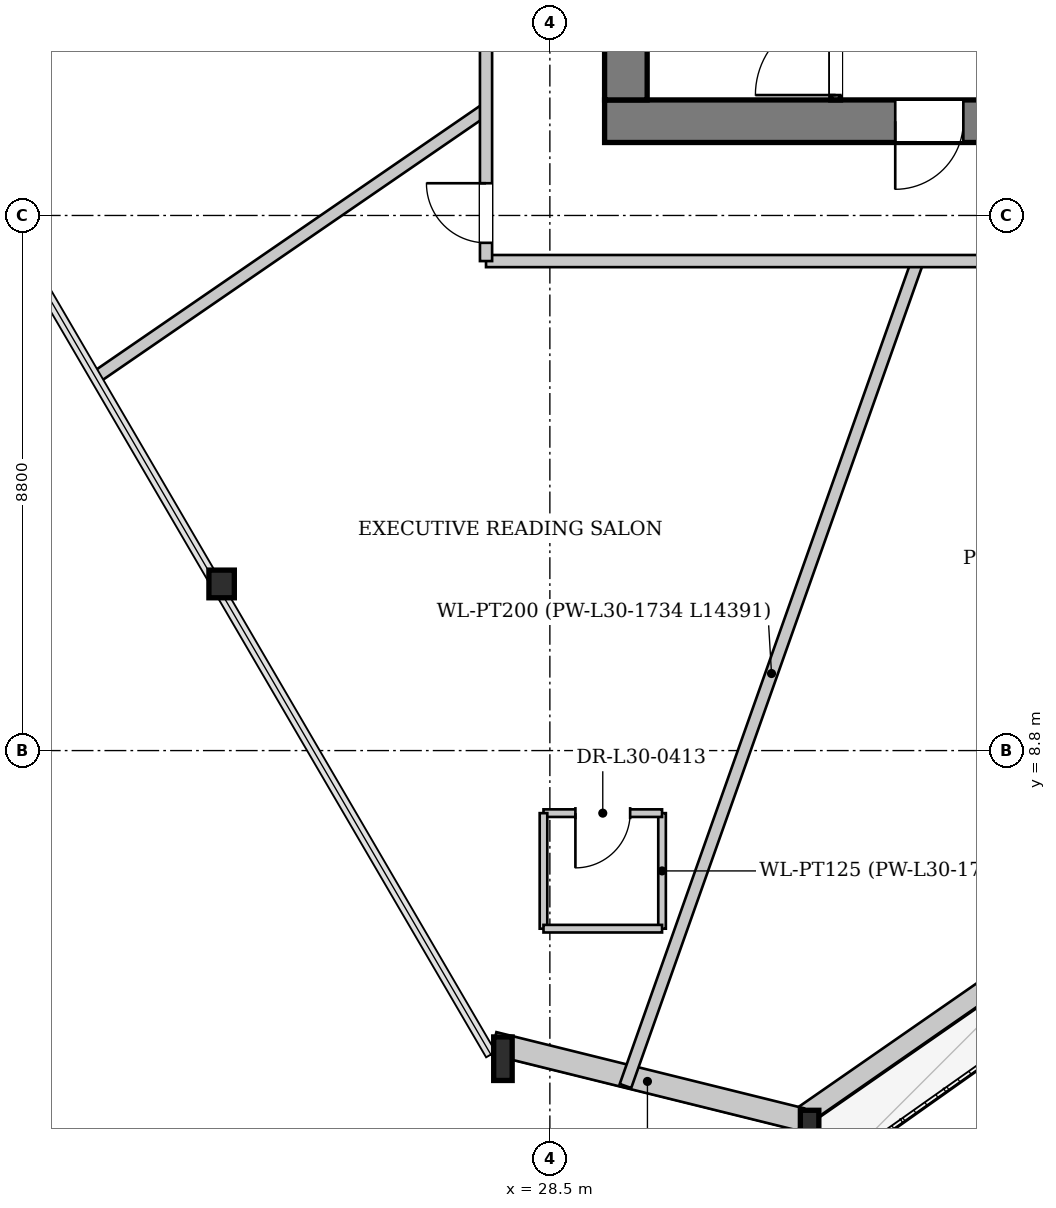
"""IFC4 building model, lengths in metres.
Left out: names, types, materials, properties, quantities, classifications, styles, units other than length and angle.
Written with IfcOpenShell. Run it as: python <this file> out.ifc"""

import sys

from ifc_helpers import new_model, si_unit, direction, frame, frame_2d, origin, origin_2d, place, context, subcontext, project, spatial, rectangle, i_section, extrude, source, transform, mapped, element, fill, save


model = new_model("IFC4")
c1 = context("Model", 3, precision=1e-05, world=origin(), true_north=direction((0.0, 1.0)))
c2 = subcontext(c1, "Body", "Model", "MODEL_VIEW")
j1 = project(units=[si_unit("LENGTHUNIT", "METRE"), si_unit("PLANEANGLEUNIT", "RADIAN")], contexts=[c1])
p1 = place(None, origin())
s1 = spatial("IfcSite", under=j1, at=p1, CompositionType="ELEMENT")
p2 = place(p1, origin())
s2 = spatial("IfcBuilding", under=s1, at=p2, CompositionType="ELEMENT")
p3 = place(p2, frame((0.0, 0.0, 116.35)))
s3 = spatial("IfcBuildingStorey", under=s2, at=p3, CompositionType="ELEMENT", Elevation=116.35)
m1 = source(origin(), c2, "Body", "SweptSolid", [
    extrude(i_section(OverallWidth=0.418, OverallDepth=0.455, WebThickness=0.038, FlangeThickness=0.059, at=origin_2d()), origin(), (0.0, 0.0, 1.0), 3.405),
])
p4 = place(p3, frame((22.951, 11.643, 0.0), z_axis=(0.088133169485, -0.060380902121, 0.994276969006), x_axis=(0.565189144003, 0.82496135152, 0.0)))
e1 = element("IfcColumn", 1, at=p4, inside=s3, PredefinedType="COLUMN", context=c2, shape_type="MappedRepresentation", body=[
    mapped(m1, transform((0.0, 0.0, 0.0), x_axis=(1.0, 0.0, 0.0), y_axis=(0.0, 1.0, 0.0), z_axis=(0.0, 0.0, 1.0), scale=1.0)),
])
m2 = source(origin(), c2, "Body", "SweptSolid", [
    extrude(i_section(OverallWidth=0.304, OverallDepth=0.716, WebThickness=0.021, FlangeThickness=0.04, at=origin_2d()), origin(), (0.0, 0.0, 1.0), 3.411),
])
p5 = place(p3, frame((27.53, 3.801, 0.0), z_axis=(0.116382892028, -0.039867940258, 0.992403934788), x_axis=(0.324071441703, 0.946032610787, 0.0)))
e2 = element("IfcColumn", 2, at=p5, inside=s3, PredefinedType="COLUMN", context=c2, shape_type="MappedRepresentation", body=[
    mapped(m2, transform((0.0, 0.0, 0.0), x_axis=(1.0, 0.0, 0.0), y_axis=(0.0, 1.0, 0.0), z_axis=(0.0, 0.0, 1.0), scale=1.0)),
])
m3 = source(origin(), c2, "Body", "SweptSolid", [
    extrude(i_section(OverallWidth=0.304, OverallDepth=0.716, WebThickness=0.021, FlangeThickness=0.04, at=origin_2d()), origin(), (0.0, 0.0, 1.0), 3.405),
])
p6 = place(p3, frame((32.588, 2.549, 0.0), z_axis=(0.107549004209, -0.013264377186, 0.994111295576), x_axis=(0.122405882176, 0.99248012575, 0.0)))
e3 = element("IfcColumn", 3, at=p6, inside=s3, PredefinedType="COLUMN", context=c2, shape_type="MappedRepresentation", body=[
    mapped(m3, transform((0.0, 0.0, 0.0), x_axis=(1.0, 0.0, 0.0), y_axis=(0.0, 1.0, 0.0), z_axis=(0.0, 0.0, 1.0), scale=1.0)),
])
p7 = place(p3, frame((52.121, 16.301, 0.0), z_axis=(0.0, 0.0, 1.0), x_axis=(-0.821520503946, -0.570178973303, 0.0)))
e4 = element("IfcWall", 4, at=p7, inside=s3, PredefinedType="SOLIDWALL", context=c2, shape_type="SweptSolid", body=[
    extrude(rectangle(XDim=23.887, YDim=0.32, at=frame_2d((11.944, 0.0))), origin(), (0.0, 0.0, 1.0), 2.692),
])
p8 = place(p7, frame((7.094, 0.0, 0.0)))
e5 = element("IfcOpeningElement", 5, at=p8, cuts=e4, PredefinedType="OPENING", context=c2, shape_type="SweptSolid", body=[
    extrude(rectangle(XDim=1.1, YDim=2.3, at=frame_2d((0.55, 1.15))), frame((0.0, 0.17, 0.0), z_axis=(0.0, -1.0, 0.0), x_axis=(1.0, 0.0, 0.0)), (0.0, 0.0, 1.0), 0.34),
])
p9 = place(p7, frame((16.777, 0.0, 0.372)))
e6 = element("IfcOpeningElement", 6, at=p9, cuts=e4, PredefinedType="OPENING", context=c2, shape_type="SweptSolid", body=[
    extrude(rectangle(XDim=1.8, YDim=2.2, at=frame_2d((0.9, 1.1))), frame((0.0, 0.17, 0.0), z_axis=(0.0, -1.0, 0.0), x_axis=(1.0, 0.0, 0.0)), (0.0, 0.0, 1.0), 0.34),
])
p10 = place(p3, frame((32.634, 2.733, 0.0), z_axis=(0.0, 0.0, 1.0), x_axis=(-0.970715706746, 0.240231173408, 0.0)))
e7 = element("IfcWall", 7, at=p10, inside=s3, PredefinedType="SOLIDWALL", context=c2, shape_type="SweptSolid", body=[
    extrude(rectangle(XDim=5.211, YDim=0.38, at=frame_2d((2.606, 0.0))), origin(), (0.0, 0.0, 1.0), 2.692),
])
p11 = place(p3, frame((46.6, 19.15, 0.0), z_axis=(0.0, 0.0, 1.0), x_axis=(-1.0, 0.0, 0.0)))
e8 = element("IfcWall", 8, at=p11, inside=s3, PredefinedType="SHEAR", context=c2, shape_type="SweptSolid", body=[
    extrude(rectangle(XDim=17.2, YDim=0.7, at=frame_2d((8.6, 0.0))), origin(), (0.0, 0.0, 1.0), 3.3),
])
p12 = place(p11, frame((4.8, 0.0, 0.0)))
e9 = element("IfcOpeningElement", 9, at=p12, cuts=e8, PredefinedType="OPENING", context=c2, shape_type="SweptSolid", body=[
    extrude(rectangle(XDim=1.12, YDim=2.25, at=frame_2d((0.56, 1.125))), frame((0.0, 0.36, 0.0), z_axis=(0.0, -1.0, 0.0), x_axis=(1.0, 0.0, 0.0)), (0.0, 0.0, 1.0), 0.72),
])
p13 = place(p11, frame((11.3, 0.0, 0.0)))
e10 = element("IfcOpeningElement", 10, at=p13, cuts=e8, PredefinedType="OPENING", context=c2, shape_type="SweptSolid", body=[
    extrude(rectangle(XDim=1.12, YDim=2.25, at=frame_2d((0.56, 1.125))), frame((0.0, 0.36, 0.0), z_axis=(0.0, -1.0, 0.0), x_axis=(1.0, 0.0, 0.0)), (0.0, 0.0, 1.0), 0.72),
])
p14 = place(p3, frame((29.75, 19.5, 0.0), z_axis=(0.0, 0.0, 1.0), x_axis=(0.0, 1.0, 0.0)))
e11 = element("IfcWall", 11, at=p14, inside=s3, PredefinedType="SHEAR", context=c2, shape_type="SweptSolid", body=[
    extrude(rectangle(XDim=14.2, YDim=0.7, at=frame_2d((7.1, 0.0))), origin(), (0.0, 0.0, 1.0), 3.3),
])
p15 = place(p14, frame((7.42, 0.0, 0.0)))
e12 = element("IfcOpeningElement", 12, at=p15, cuts=e11, PredefinedType="OPENING", context=c2, shape_type="SweptSolid", body=[
    extrude(rectangle(XDim=1.6, YDim=2.2, at=frame_2d((0.8, 1.1))), frame((0.0, 0.36, 0.0), z_axis=(0.0, -1.0, 0.0), x_axis=(1.0, 0.0, 0.0)), (0.0, 0.0, 1.0), 0.72),
])
p16 = place(p3, frame((33.2, 19.5, 0.0), z_axis=(0.0, 0.0, 1.0), x_axis=(0.0, 1.0, 0.0)))
e13 = element("IfcWall", 13, at=p16, inside=s3, PredefinedType="PARTITIONING", context=c2, shape_type="SweptSolid", body=[
    extrude(rectangle(XDim=7.46, YDim=0.16, at=frame_2d((3.73, 0.0))), origin(), (0.0, 0.0, 1.0), 3.3),
])
p17 = place(p16, frame((0.08, 0.0, 0.0)))
e14 = element("IfcOpeningElement", 14, at=p17, cuts=e13, PredefinedType="OPENING", context=c2, shape_type="SweptSolid", body=[
    extrude(rectangle(XDim=1.32, YDim=2.2, at=frame_2d((0.66, 1.1))), frame((0.0, 0.09, 0.0), z_axis=(0.0, -1.0, 0.0), x_axis=(1.0, 0.0, 0.0)), (0.0, 0.0, 1.0), 0.18),
])
p18 = place(p3, frame((34.547, 16.85, 0.0), z_axis=(0.0, 0.0, 1.0), x_axis=(-0.333802235789, -0.942643128327, 0.0)))
e15 = element("IfcWall", 15, at=p18, inside=s3, PredefinedType="PARTITIONING", context=c2, shape_type="SweptSolid", body=[
    extrude(rectangle(XDim=14.392, YDim=0.2, at=frame_2d((7.196, 0.0))), origin(), (0.0, 0.0, 1.0), 3.3),
])
p19 = place(p3, frame((27.45, 19.349, 0.0), z_axis=(0.0, 0.0, 1.0), x_axis=(-0.824117180706, -0.566419343301, 0.0)))
e16 = element("IfcWall", 16, at=p19, inside=s3, PredefinedType="PARTITIONING", context=c2, shape_type="SweptSolid", body=[
    extrude(rectangle(XDim=7.761, YDim=0.2, at=frame_2d((3.88, 0.0))), origin(), (0.0, 0.0, 1.0), 3.3),
])
p20 = place(p3, frame((30.345, 5.871, 0.0), z_axis=(0.0, 0.0, 1.0), x_axis=(0.0, 1.0, 0.0)))
e17 = element("IfcWall", 17, at=p20, inside=s3, PredefinedType="PARTITIONING", context=c2, shape_type="SweptSolid", body=[
    extrude(rectangle(XDim=1.9, YDim=0.125, at=frame_2d((0.95, 0.0))), origin(), (0.0, 0.0, 1.0), 3.3),
])
p21 = place(p3, frame((30.345, 7.771, 0.0), z_axis=(0.0, 0.0, 1.0), x_axis=(-1.0, 0.0, 0.0)))
e18 = element("IfcWall", 18, at=p21, inside=s3, PredefinedType="PARTITIONING", context=c2, shape_type="SweptSolid", body=[
    extrude(rectangle(XDim=1.95, YDim=0.125, at=frame_2d((0.975, 0.0))), origin(), (0.0, 0.0, 1.0), 3.3),
])
p22 = place(p21, frame((0.525, 0.0, 0.0)))
e19 = element("IfcOpeningElement", 19, at=p22, cuts=e18, PredefinedType="OPENING", context=c2, shape_type="SweptSolid", body=[
    extrude(rectangle(XDim=0.9, YDim=2.1, at=frame_2d((0.45, 1.05))), frame((0.0, 0.073, 0.0), z_axis=(0.0, -1.0, 0.0), x_axis=(1.0, 0.0, 0.0)), (0.0, 0.0, 1.0), 0.145),
])
p23 = place(p3, frame((28.395, 7.771, 0.0), z_axis=(0.0, 0.0, 1.0), x_axis=(0.0, -1.0, 0.0)))
e20 = element("IfcWall", 20, at=p23, inside=s3, PredefinedType="PARTITIONING", context=c2, shape_type="SweptSolid", body=[
    extrude(rectangle(XDim=1.9, YDim=0.125, at=frame_2d((0.95, 0.0))), origin(), (0.0, 0.0, 1.0), 3.3),
])
p24 = place(p3, frame((28.395, 5.871, 0.0), z_axis=(0.0, 0.0, 1.0), x_axis=(1.0, 0.0, 0.0)))
e21 = element("IfcWall", 21, at=p24, inside=s3, PredefinedType="PARTITIONING", context=c2, shape_type="SweptSolid", body=[
    extrude(rectangle(XDim=1.95, YDim=0.125, at=frame_2d((0.975, 0.0))), origin(), (0.0, 0.0, 1.0), 3.3),
])
p25 = place(p3, frame((27.45, 16.85, 0.0), z_axis=(0.0, 0.0, 1.0), x_axis=(1.0, 0.0, 0.0)))
e22 = element("IfcWall", 22, at=p25, inside=s3, PredefinedType="PARTITIONING", context=c2, shape_type="SweptSolid", body=[
    extrude(rectangle(XDim=21.1, YDim=0.2, at=frame_2d((10.55, 0.0))), origin(), (0.0, 0.0, 1.0), 3.045),
])
p26 = place(p25, frame((8.224, 0.0, 0.0)))
e23 = element("IfcOpeningElement", 23, at=p26, cuts=e22, PredefinedType="OPENING", context=c2, shape_type="SweptSolid", body=[
    extrude(rectangle(XDim=0.98, YDim=2.15, at=frame_2d((0.49, 1.075))), frame((0.0, 0.11, 0.0), z_axis=(0.0, -1.0, 0.0), x_axis=(1.0, 0.0, 0.0)), (0.0, 0.0, 1.0), 0.22),
])
p27 = place(p25, frame((19.82, 0.0, 0.0)))
e24 = element("IfcOpeningElement", 24, at=p27, cuts=e22, PredefinedType="OPENING", context=c2, shape_type="SweptSolid", body=[
    extrude(rectangle(XDim=0.98, YDim=2.15, at=frame_2d((0.49, 1.075))), frame((0.0, 0.11, 0.0), z_axis=(0.0, -1.0, 0.0), x_axis=(1.0, 0.0, 0.0)), (0.0, 0.0, 1.0), 0.22),
])
p28 = place(p3, frame((27.45, 16.85, 0.0), z_axis=(0.0, 0.0, 1.0), x_axis=(0.0, 1.0, 0.0)))
e25 = element("IfcWall", 25, at=p28, inside=s3, PredefinedType="PARTITIONING", context=c2, shape_type="SweptSolid", body=[
    extrude(rectangle(XDim=19.5, YDim=0.2, at=frame_2d((9.75, 0.0))), origin(), (0.0, 0.0, 1.0), 3.3),
])
p29 = place(p28, frame((17.434, 0.0, 0.0)))
e26 = element("IfcOpeningElement", 26, at=p29, cuts=e25, PredefinedType="OPENING", context=c2, shape_type="SweptSolid", body=[
    extrude(rectangle(XDim=0.98, YDim=2.15, at=frame_2d((0.49, 1.075))), frame((0.0, 0.11, 0.0), z_axis=(0.0, -1.0, 0.0), x_axis=(1.0, 0.0, 0.0)), (0.0, 0.0, 1.0), 0.22),
])
p30 = place(p28, frame((7.437, 0.0, 0.0)))
e27 = element("IfcOpeningElement", 27, at=p30, cuts=e25, PredefinedType="OPENING", context=c2, shape_type="SweptSolid", body=[
    extrude(rectangle(XDim=0.98, YDim=2.15, at=frame_2d((0.49, 1.075))), frame((0.0, 0.11, 0.0), z_axis=(0.0, -1.0, 0.0), x_axis=(1.0, 0.0, 0.0)), (0.0, 0.0, 1.0), 0.22),
])
p31 = place(p28, frame((0.3, 0.0, 0.0)))
e28 = element("IfcOpeningElement", 28, at=p31, cuts=e25, PredefinedType="OPENING", context=c2, shape_type="SweptSolid", body=[
    extrude(rectangle(XDim=0.98, YDim=2.15, at=frame_2d((0.49, 1.075))), frame((0.0, 0.11, 0.0), z_axis=(0.0, -1.0, 0.0), x_axis=(1.0, 0.0, 0.0)), (0.0, 0.0, 1.0), 0.22),
])
m4 = source(origin(), c2, "Body", "SweptSolid", [
    extrude(rectangle(XDim=1.12, YDim=2.25, at=frame_2d((0.56, 1.125))), frame((0.0, 0.025, 0.0), z_axis=(0.0, -1.0, 0.0), x_axis=(1.0, 0.0, 0.0)), (0.0, 0.0, 1.0), 0.05),
])
p32 = place(p13, origin())
e29 = element("IfcDoor", 29, at=p32, inside=s3, OperationType="SINGLE_SWING_RIGHT", PredefinedType="DOOR", context=c2, shape_type="MappedRepresentation", body=[
    mapped(m4, transform((0.0, 0.0, 0.0), x_axis=(1.0, 0.0, 0.0), y_axis=(0.0, 1.0, 0.0), z_axis=(0.0, 0.0, 1.0), scale=1.0)),
])
fill(e10, e29)
m5 = source(origin(), c2, "Body", "SweptSolid", [
    extrude(rectangle(XDim=1.32, YDim=2.2, at=frame_2d((0.66, 1.1))), frame((0.0, 0.025, 0.0), z_axis=(0.0, -1.0, 0.0), x_axis=(1.0, 0.0, 0.0)), (0.0, 0.0, 1.0), 0.05),
])
p33 = place(p17, origin())
e30 = element("IfcDoor", 30, at=p33, inside=s3, OperationType="SINGLE_SWING_LEFT", PredefinedType="DOOR", context=c2, shape_type="MappedRepresentation", body=[
    mapped(m5, transform((0.0, 0.0, 0.0), x_axis=(1.0, 0.0, 0.0), y_axis=(0.0, 1.0, 0.0), z_axis=(0.0, 0.0, 1.0), scale=1.0)),
])
fill(e14, e30)
m6 = source(origin(), c2, "Body", "SweptSolid", [
    extrude(rectangle(XDim=0.9, YDim=2.1, at=frame_2d((0.45, 1.05))), frame((0.0, 0.025, 0.0), z_axis=(0.0, -1.0, 0.0), x_axis=(1.0, 0.0, 0.0)), (0.0, 0.0, 1.0), 0.05),
])
p34 = place(p22, origin())
e31 = element("IfcDoor", 31, at=p34, inside=s3, OperationType="SINGLE_SWING_RIGHT", PredefinedType="DOOR", context=c2, shape_type="MappedRepresentation", body=[
    mapped(m6, transform((0.0, 0.0, 0.0), x_axis=(1.0, 0.0, 0.0), y_axis=(0.0, 1.0, 0.0), z_axis=(0.0, 0.0, 1.0), scale=1.0)),
])
fill(e19, e31)
m7 = source(origin(), c2, "Body", "SweptSolid", [
    extrude(rectangle(XDim=0.98, YDim=2.15, at=frame_2d((0.49, 1.075))), frame((0.0, 0.025, 0.0), z_axis=(0.0, -1.0, 0.0), x_axis=(1.0, 0.0, 0.0)), (0.0, 0.0, 1.0), 0.05),
])
p35 = place(p31, origin())
e32 = element("IfcDoor", 32, at=p35, inside=s3, OperationType="SINGLE_SWING_RIGHT", PredefinedType="DOOR", context=c2, shape_type="MappedRepresentation", body=[
    mapped(m7, transform((0.0, 0.0, 0.0), x_axis=(1.0, 0.0, 0.0), y_axis=(0.0, 1.0, 0.0), z_axis=(0.0, 0.0, 1.0), scale=1.0)),
])
fill(e28, e32)
save(model, sys.argv[1])
